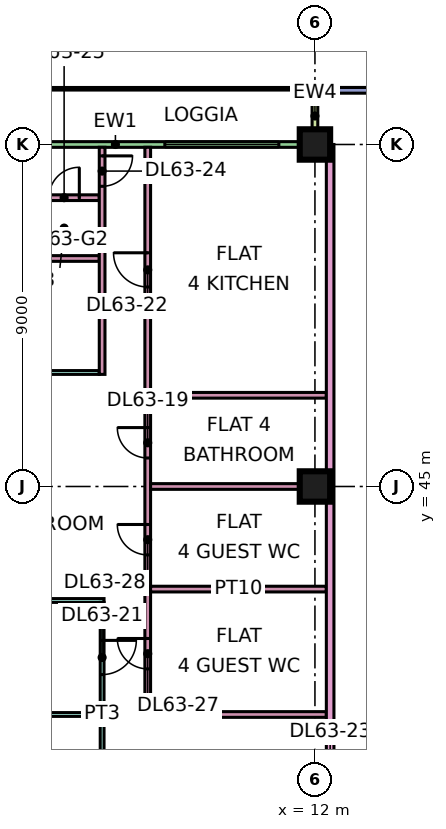
"""IFC4 building model, lengths in metres.
Left out: names, types, materials, properties, quantities, classifications, styles, units other than length and angle.
Written with IfcOpenShell. Run it as: python <this file> out.ifc"""

import sys

from ifc_helpers import new_model, si_unit, direction, frame, frame_2d, origin, origin_2d, place, context, subcontext, project, spatial, rectangle, extrude, element, fill, save


model = new_model("IFC4")
c1 = context("Model", 3, precision=1e-05, world=origin(), true_north=direction((0.0, 1.0)))
c2 = subcontext(c1, "Body", "Model", "MODEL_VIEW")
j1 = project(units=[si_unit("LENGTHUNIT", "METRE"), si_unit("PLANEANGLEUNIT", "RADIAN")], contexts=[c1])
p1 = place(None, origin())
s1 = spatial("IfcSite", under=j1, at=p1, CompositionType="ELEMENT")
p2 = place(p1, origin())
s2 = spatial("IfcBuilding", under=s1, at=p2, CompositionType="ELEMENT")
p3 = place(p2, frame((0.0, 0.0, 273.4)))
s3 = spatial("IfcBuildingStorey", under=s2, at=p3, CompositionType="ELEMENT", Elevation=273.4)
for number, where, z_axis, x_axis in (
    (1, (12.0, 45.0, 0.0), (0.0, 0.0, 1.0), (1.0, 0.0, 0.0)),
    (2, (12.0, 54.0, 0.0), (0.0, 0.0, 1.0), (1.0, 0.0, 0.0)),
):
    element("IfcColumn", number, at=place(p3, frame(where, z_axis=z_axis, x_axis=x_axis)), inside=s3, PredefinedType="COLUMN", context=c2, shape_type="SweptSolid", body=[
        extrude(rectangle(XDim=0.8, YDim=0.8, at=origin_2d()), origin(), (0.0, 0.0, 1.0), 3.75),
    ])
p4 = place(p3, frame((22.5, 55.425, 0.0), z_axis=(0.0, 0.0, 1.0), x_axis=(-1.0, 0.0, 0.0)))
e3 = element("IfcWall", 3, at=p4, inside=s3, PredefinedType="SOLIDWALL", context=c2, shape_type="SweptSolid", body=[
    extrude(rectangle(XDim=10.425, YDim=0.15, at=frame_2d((5.212, 0.0))), origin(), (0.0, 0.0, 1.0), 3.35),
])
p5 = place(p4, frame((1.05, 0.0, 0.45)))
e4 = element("IfcOpeningElement", 4, at=p5, cuts=e3, PredefinedType="OPENING", context=c2, shape_type="SweptSolid", body=[
    extrude(rectangle(XDim=4.8, YDim=2.4, at=frame_2d((2.4, 1.2))), frame((0.0, 0.085, 0.0), z_axis=(0.0, -1.0, 0.0), x_axis=(1.0, 0.0, 0.0)), (0.0, 0.0, 1.0), 0.17),
])
p6 = place(p3, frame((11.925, 54.0, 0.0), z_axis=(0.0, 0.0, 1.0), x_axis=(-1.0, 0.0, 0.0)))
e5 = element("IfcWall", 5, at=p6, inside=s3, PredefinedType="SOLIDWALL", context=c2, shape_type="SweptSolid", body=[
    extrude(rectangle(XDim=10.35, YDim=0.15, at=frame_2d((5.175, 0.0))), origin(), (0.0, 0.0, 1.0), 3.35),
])
p7 = place(p6, frame((0.875, 0.0, 0.45)))
e6 = element("IfcOpeningElement", 6, at=p7, cuts=e5, PredefinedType="OPENING", context=c2, shape_type="SweptSolid", body=[
    extrude(rectangle(XDim=3.0, YDim=2.4, at=frame_2d((1.5, 1.2))), frame((0.0, 0.085, 0.0), z_axis=(0.0, -1.0, 0.0), x_axis=(1.0, 0.0, 0.0)), (0.0, 0.0, 1.0), 0.17),
])
p8 = place(p6, frame((7.038, 0.0, 0.0)))
e7 = element("IfcOpeningElement", 7, at=p8, cuts=e5, PredefinedType="OPENING", context=c2, shape_type="SweptSolid", body=[
    extrude(rectangle(XDim=1.8, YDim=2.4, at=frame_2d((0.9, 1.2))), frame((0.0, 0.085, 0.0), z_axis=(0.0, -1.0, 0.0), x_axis=(1.0, 0.0, 0.0)), (0.0, 0.0, 1.0), 0.17),
])
p9 = place(p3, frame((12.0, 55.5, 0.0), z_axis=(0.0, 0.0, 1.0), x_axis=(0.0, -1.0, 0.0)))
e8 = element("IfcWall", 8, at=p9, inside=s3, PredefinedType="SOLIDWALL", context=c2, shape_type="SweptSolid", body=[
    extrude(rectangle(XDim=1.5, YDim=0.15, at=frame_2d((0.75, 0.0))), origin(), (0.0, 0.0, 1.0), 3.35),
])
p10 = place(p3, frame((-1.351, 39.0, 0.0), z_axis=(0.0, 0.0, 1.0), x_axis=(1.0, 0.0, 0.0)))
e9 = element("IfcWall", 9, at=p10, inside=s3, PredefinedType="PARTITIONING", context=c2, shape_type="SweptSolid", body=[
    extrude(rectangle(XDim=7.701, YDim=0.1, at=frame_2d((3.851, 0.0))), origin(), (0.0, 0.0, 1.0), 3.35),
])
p11 = place(p3, frame((-1.35, 42.0, 0.0), z_axis=(0.0, 0.0, 1.0), x_axis=(1.0, 0.0, 0.0)))
e10 = element("IfcWall", 10, at=p11, inside=s3, PredefinedType="PARTITIONING", context=c2, shape_type="SweptSolid", body=[
    extrude(rectangle(XDim=7.8, YDim=0.1, at=frame_2d((3.9, 0.0))), origin(), (0.0, 0.0, 1.0), 3.35),
])
p12 = place(p3, frame((0.0, 48.0, 0.0), z_axis=(0.0, 0.0, 1.0), x_axis=(1.0, 0.0, 0.0)))
e11 = element("IfcWall", 11, at=p12, inside=s3, PredefinedType="PARTITIONING", context=c2, shape_type="SweptSolid", body=[
    extrude(rectangle(XDim=6.325, YDim=0.1, at=frame_2d((3.163, 0.0))), origin(), (0.0, 0.0, 1.0), 3.35),
])
p13 = place(p12, frame((2.4, 0.0, 0.0)))
e12 = element("IfcOpeningElement", 12, at=p13, cuts=e11, PredefinedType="OPENING", context=c2, shape_type="SweptSolid", body=[
    extrude(rectangle(XDim=1.6, YDim=2.1, at=frame_2d((0.8, 1.05))), frame((0.0, 0.06, 0.0), z_axis=(0.0, -1.0, 0.0), x_axis=(1.0, 0.0, 0.0)), (0.0, 0.0, 1.0), 0.12),
])
p14 = place(p3, frame((0.074, 51.0, 0.0), z_axis=(0.0, 0.0, 1.0), x_axis=(1.0, 0.0, 0.0)))
e13 = element("IfcWall", 13, at=p14, inside=s3, PredefinedType="PARTITIONING", context=c2, shape_type="SweptSolid", body=[
    extrude(rectangle(XDim=6.251, YDim=0.15, at=frame_2d((3.125, 0.0))), origin(), (0.0, 0.0, 1.0), 3.35),
])
p15 = place(p3, frame((4.325, 52.6, 0.0), z_axis=(0.0, 0.0, 1.0), x_axis=(1.0, 0.0, 0.0)))
e14 = element("IfcWall", 14, at=p15, inside=s3, PredefinedType="PARTITIONING", context=c2, shape_type="SweptSolid", body=[
    extrude(rectangle(XDim=2.0, YDim=0.15, at=frame_2d((1.0, 0.0))), origin(), (0.0, 0.0, 1.0), 3.35),
])
p16 = place(p15, frame((0.675, 0.0, 0.0)))
e15 = element("IfcOpeningElement", 15, at=p16, cuts=e14, PredefinedType="OPENING", context=c2, shape_type="SweptSolid", body=[
    extrude(rectangle(XDim=0.8, YDim=2.1, at=frame_2d((0.4, 1.05))), frame((0.0, 0.085, 0.0), z_axis=(0.0, -1.0, 0.0), x_axis=(1.0, 0.0, 0.0)), (0.0, 0.0, 1.0), 0.17),
])
p17 = place(p3, frame((6.4, 36.1, 0.0), z_axis=(0.0, 0.0, 1.0), x_axis=(0.0, 1.0, 0.0)))
e16 = element("IfcWall", 16, at=p17, inside=s3, PredefinedType="PARTITIONING", context=c2, shape_type="SweptSolid", body=[
    extrude(rectangle(XDim=5.85, YDim=0.1, at=frame_2d((2.925, 0.0))), origin(), (0.0, 0.0, 1.0), 3.35),
])
p18 = place(p17, frame((0.95, 0.0, 0.0)))
e17 = element("IfcOpeningElement", 17, at=p18, cuts=e16, PredefinedType="OPENING", context=c2, shape_type="SweptSolid", body=[
    extrude(rectangle(XDim=0.9, YDim=2.1, at=frame_2d((0.45, 1.05))), frame((0.0, 0.06, 0.0), z_axis=(0.0, -1.0, 0.0), x_axis=(1.0, 0.0, 0.0)), (0.0, 0.0, 1.0), 0.12),
])
p19 = place(p17, frame((3.95, 0.0, 0.0)))
e18 = element("IfcOpeningElement", 18, at=p19, cuts=e16, PredefinedType="OPENING", context=c2, shape_type="SweptSolid", body=[
    extrude(rectangle(XDim=0.9, YDim=2.1, at=frame_2d((0.45, 1.05))), frame((0.0, 0.06, 0.0), z_axis=(0.0, -1.0, 0.0), x_axis=(1.0, 0.0, 0.0)), (0.0, 0.0, 1.0), 0.12),
])
p20 = place(p3, frame((6.4, 47.95, 0.0), z_axis=(0.0, 0.0, 1.0), x_axis=(0.0, 1.0, 0.0)))
e19 = element("IfcWall", 19, at=p20, inside=s3, PredefinedType="PARTITIONING", context=c2, shape_type="SweptSolid", body=[
    extrude(rectangle(XDim=5.976, YDim=0.15, at=frame_2d((2.988, 0.0))), origin(), (0.0, 0.0, 1.0), 3.35),
])
p21 = place(p20, frame((4.95, 0.0, 0.0)))
e20 = element("IfcOpeningElement", 20, at=p21, cuts=e19, PredefinedType="OPENING", context=c2, shape_type="SweptSolid", body=[
    extrude(rectangle(XDim=0.8, YDim=2.1, at=frame_2d((0.4, 1.05))), frame((0.0, 0.085, 0.0), z_axis=(0.0, -1.0, 0.0), x_axis=(1.0, 0.0, 0.0)), (0.0, 0.0, 1.0), 0.17),
])
p22 = place(p3, frame((7.6, 38.925, 0.0), z_axis=(0.0, 0.0, 1.0), x_axis=(0.0, 1.0, 0.0)))
e21 = element("IfcWall", 21, at=p22, inside=s3, PredefinedType="PARTITIONING", context=c2, shape_type="SweptSolid", body=[
    extrude(rectangle(XDim=15.001, YDim=0.15, at=frame_2d((7.5, 0.0))), origin(), (0.0, 0.0, 1.0), 3.35),
])
p23 = place(p22, frame((6.825, 0.0, 0.0)))
e22 = element("IfcOpeningElement", 22, at=p23, cuts=e21, PredefinedType="OPENING", context=c2, shape_type="SweptSolid", body=[
    extrude(rectangle(XDim=0.8, YDim=2.1, at=frame_2d((0.4, 1.05))), frame((0.0, 0.085, 0.0), z_axis=(0.0, -1.0, 0.0), x_axis=(1.0, 0.0, 0.0)), (0.0, 0.0, 1.0), 0.17),
])
p24 = place(p22, frame((11.325, 0.0, 0.0)))
e23 = element("IfcOpeningElement", 23, at=p24, cuts=e21, PredefinedType="OPENING", context=c2, shape_type="SweptSolid", body=[
    extrude(rectangle(XDim=0.9, YDim=2.1, at=frame_2d((0.45, 1.05))), frame((0.0, 0.085, 0.0), z_axis=(0.0, -1.0, 0.0), x_axis=(1.0, 0.0, 0.0)), (0.0, 0.0, 1.0), 0.17),
])
p25 = place(p22, frame((1.275, 0.0, 0.0)))
e24 = element("IfcOpeningElement", 24, at=p25, cuts=e21, PredefinedType="OPENING", context=c2, shape_type="SweptSolid", body=[
    extrude(rectangle(XDim=0.8, YDim=2.1, at=frame_2d((0.4, 1.05))), frame((0.0, 0.085, 0.0), z_axis=(0.0, -1.0, 0.0), x_axis=(1.0, 0.0, 0.0)), (0.0, 0.0, 1.0), 0.17),
])
p26 = place(p22, frame((4.275, 0.0, 0.0)))
e25 = element("IfcOpeningElement", 25, at=p26, cuts=e21, PredefinedType="OPENING", context=c2, shape_type="SweptSolid", body=[
    extrude(rectangle(XDim=0.8, YDim=2.1, at=frame_2d((0.4, 1.05))), frame((0.0, 0.085, 0.0), z_axis=(0.0, -1.0, 0.0), x_axis=(1.0, 0.0, 0.0)), (0.0, 0.0, 1.0), 0.17),
])
for number, where, z_axis, x_axis in (
    (26, (7.675, 39.0, 0.0), (0.0, 0.0, 1.0), (1.0, 0.0, 0.0)),
    (27, (7.675, 42.3, 0.0), (0.0, 0.0, 1.0), (1.0, 0.0, 0.0)),
    (28, (7.675, 45.0, 0.0), (0.0, 0.0, 1.0), (1.0, 0.0, 0.0)),
    (29, (7.675, 47.4, 0.0), (0.0, 0.0, 1.0), (1.0, 0.0, 0.0)),
):
    element("IfcWall", number, at=place(p3, frame(where, z_axis=z_axis, x_axis=x_axis)), inside=s3, PredefinedType="PARTITIONING", context=c2, shape_type="SweptSolid", body=[
        extrude(rectangle(XDim=4.625, YDim=0.15, at=frame_2d((2.312, 0.0))), origin(), (0.0, 0.0, 1.0), 3.35),
    ])
p27 = place(p3, frame((12.4, 20.0, 0.0), z_axis=(0.0, 0.0, 1.0), x_axis=(0.0, 1.0, 0.0)))
e30 = element("IfcWall", 30, at=p27, inside=s3, PredefinedType="PARTITIONING", context=c2, shape_type="SweptSolid", body=[
    extrude(rectangle(XDim=34.0, YDim=0.2, at=frame_2d((17.0, 0.0))), origin(), (0.0, 0.0, 1.0), 3.35),
])
p28 = place(p27, frame((16.95, 0.0, 0.0)))
e31 = element("IfcOpeningElement", 31, at=p28, cuts=e30, PredefinedType="OPENING", context=c2, shape_type="SweptSolid", body=[
    extrude(rectangle(XDim=1.0, YDim=2.1, at=frame_2d((0.5, 1.05))), frame((0.0, 0.11, 0.0), z_axis=(0.0, -1.0, 0.0), x_axis=(1.0, 0.0, 0.0)), (0.0, 0.0, 1.0), 0.22),
])
p29 = place(p27, frame((0.6, 0.0, 0.0)))
e32 = element("IfcOpeningElement", 32, at=p29, cuts=e30, PredefinedType="OPENING", context=c2, shape_type="SweptSolid", body=[
    extrude(rectangle(XDim=1.2, YDim=2.1, at=frame_2d((0.6, 1.05))), frame((0.0, 0.11, 0.0), z_axis=(0.0, -1.0, 0.0), x_axis=(1.0, 0.0, 0.0)), (0.0, 0.0, 1.0), 0.22),
])
p30 = place(p27, frame((13.65, 0.0, 0.0)))
e33 = element("IfcOpeningElement", 33, at=p30, cuts=e30, PredefinedType="OPENING", context=c2, shape_type="SweptSolid", body=[
    extrude(rectangle(XDim=1.0, YDim=2.1, at=frame_2d((0.5, 1.05))), frame((0.0, 0.11, 0.0), z_axis=(0.0, -1.0, 0.0), x_axis=(1.0, 0.0, 0.0)), (0.0, 0.0, 1.0), 0.22),
])
p31 = place(p7, origin())
e34 = element("IfcWindow", 34, at=p31, inside=s3, PartitioningType="SINGLE_PANEL", PredefinedType="WINDOW", context=c2, shape_type="SweptSolid", body=[
    extrude(rectangle(XDim=3.0, YDim=2.4, at=frame_2d((1.5, 1.2))), frame((0.0, 0.03, 0.0), z_axis=(0.0, -1.0, 0.0), x_axis=(1.0, 0.0, 0.0)), (0.0, 0.0, 1.0), 0.06),
])
fill(e6, e34)
p32 = place(p23, frame((0.8, 0.0, 0.0), z_axis=(0.0, 0.0, 1.0), x_axis=(-1.0, 0.0, 0.0)))
e35 = element("IfcDoor", 35, at=p32, inside=s3, OperationType="SINGLE_SWING_RIGHT", PredefinedType="DOOR", context=c2, shape_type="SweptSolid", body=[
    extrude(rectangle(XDim=0.8, YDim=2.1, at=frame_2d((0.4, 1.05))), frame((0.0, 0.025, 0.0), z_axis=(0.0, -1.0, 0.0), x_axis=(1.0, 0.0, 0.0)), (0.0, 0.0, 1.0), 0.05),
])
fill(e22, e35)
p33 = place(p19, origin())
e36 = element("IfcDoor", 36, at=p33, inside=s3, OperationType="SINGLE_SWING_RIGHT", PredefinedType="DOOR", context=c2, shape_type="SweptSolid", body=[
    extrude(rectangle(XDim=0.9, YDim=2.1, at=frame_2d((0.45, 1.05))), frame((0.0, 0.025, 0.0), z_axis=(0.0, -1.0, 0.0), x_axis=(1.0, 0.0, 0.0)), (0.0, 0.0, 1.0), 0.05),
])
fill(e18, e36)
p34 = place(p24, frame((0.9, 0.0, 0.0), z_axis=(0.0, 0.0, 1.0), x_axis=(-1.0, 0.0, 0.0)))
e37 = element("IfcDoor", 37, at=p34, inside=s3, OperationType="SINGLE_SWING_RIGHT", PredefinedType="DOOR", context=c2, shape_type="SweptSolid", body=[
    extrude(rectangle(XDim=0.9, YDim=2.1, at=frame_2d((0.45, 1.05))), frame((0.0, 0.025, 0.0), z_axis=(0.0, -1.0, 0.0), x_axis=(1.0, 0.0, 0.0)), (0.0, 0.0, 1.0), 0.05),
])
fill(e23, e37)
p35 = place(p21, origin())
e38 = element("IfcDoor", 38, at=p35, inside=s3, OperationType="SINGLE_SWING_RIGHT", PredefinedType="DOOR", context=c2, shape_type="SweptSolid", body=[
    extrude(rectangle(XDim=0.8, YDim=2.1, at=frame_2d((0.4, 1.05))), frame((0.0, 0.025, 0.0), z_axis=(0.0, -1.0, 0.0), x_axis=(1.0, 0.0, 0.0)), (0.0, 0.0, 1.0), 0.05),
])
fill(e20, e38)
p36 = place(p16, frame((0.8, 0.0, 0.0), z_axis=(0.0, 0.0, 1.0), x_axis=(-1.0, 0.0, 0.0)))
e39 = element("IfcDoor", 39, at=p36, inside=s3, OperationType="SINGLE_SWING_RIGHT", PredefinedType="DOOR", context=c2, shape_type="SweptSolid", body=[
    extrude(rectangle(XDim=0.8, YDim=2.1, at=frame_2d((0.4, 1.05))), frame((0.0, 0.025, 0.0), z_axis=(0.0, -1.0, 0.0), x_axis=(1.0, 0.0, 0.0)), (0.0, 0.0, 1.0), 0.05),
])
fill(e15, e39)
p37 = place(p25, frame((0.8, 0.0, 0.0), z_axis=(0.0, 0.0, 1.0), x_axis=(-1.0, 0.0, 0.0)))
e40 = element("IfcDoor", 40, at=p37, inside=s3, OperationType="SINGLE_SWING_RIGHT", PredefinedType="DOOR", context=c2, shape_type="SweptSolid", body=[
    extrude(rectangle(XDim=0.8, YDim=2.1, at=frame_2d((0.4, 1.05))), frame((0.0, 0.025, 0.0), z_axis=(0.0, -1.0, 0.0), x_axis=(1.0, 0.0, 0.0)), (0.0, 0.0, 1.0), 0.05),
])
fill(e24, e40)
p38 = place(p26, frame((0.8, 0.0, 0.0), z_axis=(0.0, 0.0, 1.0), x_axis=(-1.0, 0.0, 0.0)))
e41 = element("IfcDoor", 41, at=p38, inside=s3, OperationType="SINGLE_SWING_RIGHT", PredefinedType="DOOR", context=c2, shape_type="SweptSolid", body=[
    extrude(rectangle(XDim=0.8, YDim=2.1, at=frame_2d((0.4, 1.05))), frame((0.0, 0.025, 0.0), z_axis=(0.0, -1.0, 0.0), x_axis=(1.0, 0.0, 0.0)), (0.0, 0.0, 1.0), 0.05),
])
fill(e25, e41)
save(model, sys.argv[1])
